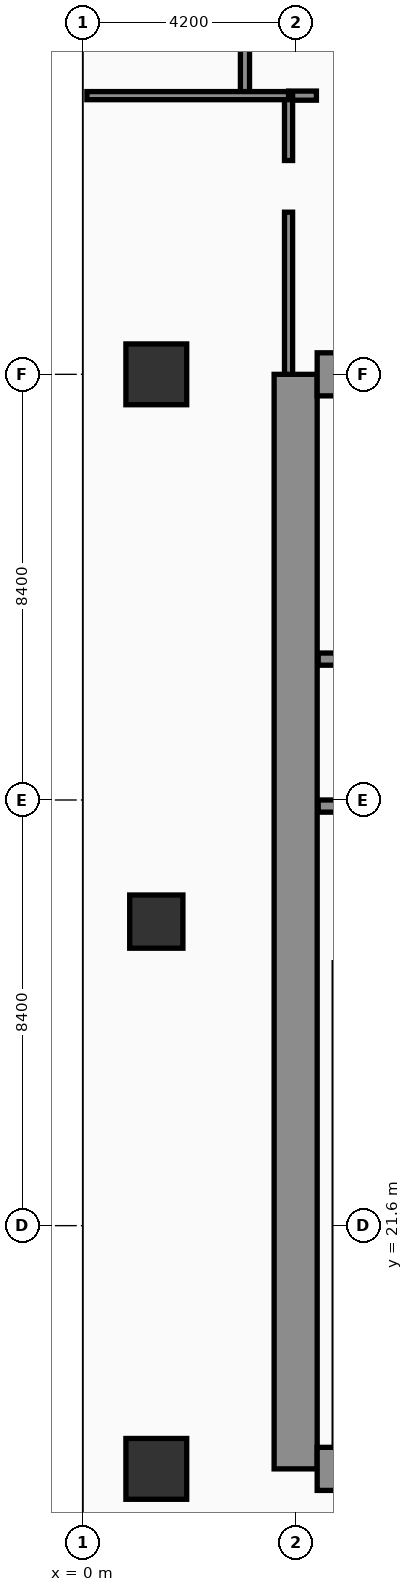
"""IFC4 building model, lengths in metres.
Left out: names, types, materials, properties, quantities, classifications, styles, units other than length and angle.
Written with IfcOpenShell. Run it as: python <this file> out.ifc"""

import sys

from ifc_helpers import new_model, si_unit, direction, frame, frame_2d, origin, origin_2d, place, context, subcontext, project, spatial, rectangle, extrude, element, fill, save


model = new_model("IFC4")
c1 = context("Model", 3, precision=1e-05, world=origin(), true_north=direction((0.0, 1.0)))
c2 = subcontext(c1, "Body", "Model", "MODEL_VIEW")
j1 = project(units=[si_unit("LENGTHUNIT", "METRE"), si_unit("PLANEANGLEUNIT", "RADIAN")], contexts=[c1])
p1 = place(None, origin())
s1 = spatial("IfcSite", under=j1, at=p1, CompositionType="ELEMENT")
p2 = place(p1, origin())
s2 = spatial("IfcBuilding", under=s1, at=p2, CompositionType="ELEMENT")
p3 = place(p2, frame((0.0, 0.0, 144.0)))
s3 = spatial("IfcBuildingStorey", under=s2, at=p3, CompositionType="ELEMENT", Elevation=144.0)
p4 = place(p3, frame((4.2, 16.8, 0.0), z_axis=(0.0, 0.0, 1.0), x_axis=(0.0, 1.0, 0.0)))
e1 = element("IfcWall", 1, at=p4, inside=s3, PredefinedType="SHEAR", context=c2, shape_type="SweptSolid", body=[
    extrude(rectangle(XDim=21.6, YDim=0.85, at=frame_2d((10.8, 0.0))), origin(), (0.0, 0.0, 1.0), 4.26),
])
p5 = place(p3, frame((4.625, 38.4, 0.0), z_axis=(0.0, 0.0, 1.0), x_axis=(1.0, 0.0, 0.0)))
e2 = element("IfcWall", 2, at=p5, inside=s3, PredefinedType="SHEAR", context=c2, shape_type="SweptSolid", body=[
    extrude(rectangle(XDim=9.95, YDim=0.85, at=frame_2d((4.975, 0.0))), origin(), (0.0, 0.0, 1.0), 4.26),
])
p6 = place(p5, frame((5.68, 0.0, 0.0)))
e3 = element("IfcOpeningElement", 3, at=p6, cuts=e2, PredefinedType="OPENING", context=c2, shape_type="SweptSolid", body=[
    extrude(rectangle(XDim=1.1, YDim=2.2, at=frame_2d((0.55, 1.1))), frame((0.0, 0.435, 0.0), z_axis=(0.0, -1.0, 0.0), x_axis=(1.0, 0.0, 0.0)), (0.0, 0.0, 1.0), 0.87),
])
p7 = place(p3, frame((4.625, 16.8, 0.0), z_axis=(0.0, 0.0, 1.0), x_axis=(1.0, 0.0, 0.0)))
e4 = element("IfcWall", 4, at=p7, inside=s3, PredefinedType="SHEAR", context=c2, shape_type="SweptSolid", body=[
    extrude(rectangle(XDim=9.95, YDim=0.85, at=frame_2d((4.975, 0.0))), origin(), (0.0, 0.0, 1.0), 4.26),
])
p8 = place(p3, frame((1.45, 16.8, 0.0), z_axis=(0.0, 0.0, 1.0), x_axis=(1.0, 0.0, 0.0)))
e5 = element("IfcColumn", 5, at=p8, inside=s3, PredefinedType="COLUMN", context=c2, shape_type="SweptSolid", body=[
    extrude(rectangle(XDim=1.2, YDim=1.2, at=origin_2d()), origin(), (0.0, 0.0, 1.0), 4.26),
])
p9 = place(p3, frame((1.45, 27.6, 0.0), z_axis=(0.0, 0.0, 1.0), x_axis=(1.0, 0.0, 0.0)))
e6 = element("IfcColumn", 6, at=p9, inside=s3, PredefinedType="COLUMN", context=c2, shape_type="SweptSolid", body=[
    extrude(rectangle(XDim=1.05, YDim=1.05, at=origin_2d()), origin(), (0.0, 0.0, 1.0), 4.26),
])
p10 = place(p3, frame((1.45, 38.4, 0.0), z_axis=(0.0, 0.0, 1.0), x_axis=(1.0, 0.0, 0.0)))
e7 = element("IfcColumn", 7, at=p10, inside=s3, PredefinedType="COLUMN", context=c2, shape_type="SweptSolid", body=[
    extrude(rectangle(XDim=1.2, YDim=1.2, at=origin_2d()), origin(), (0.0, 0.0, 1.0), 4.26),
])
p11 = place(p3, frame((4.645, 29.88, 0.0), z_axis=(0.0, 0.0, 1.0), x_axis=(1.0, 0.0, 0.0)))
e8 = element("IfcWall", 8, at=p11, inside=s3, PredefinedType="SOLIDWALL", context=c2, shape_type="SweptSolid", body=[
    extrude(rectangle(XDim=4.775, YDim=0.24, at=frame_2d((2.387, 0.0))), origin(), (0.0, 0.0, 1.0), 4.26),
])
p12 = place(p11, frame((0.45, 0.0, 0.0)))
e9 = element("IfcOpeningElement", 9, at=p12, cuts=e8, PredefinedType="OPENING", context=c2, shape_type="SweptSolid", body=[
    extrude(rectangle(XDim=1.3, YDim=2.35, at=frame_2d((0.65, 1.175))), frame((0.0, 0.13, 0.0), z_axis=(0.0, -1.0, 0.0), x_axis=(1.0, 0.0, 0.0)), (0.0, 0.0, 1.0), 0.26),
])
p13 = place(p3, frame((4.645, 32.78, 0.0), z_axis=(0.0, 0.0, 1.0), x_axis=(1.0, 0.0, 0.0)))
e10 = element("IfcWall", 10, at=p13, inside=s3, PredefinedType="SOLIDWALL", context=c2, shape_type="SweptSolid", body=[
    extrude(rectangle(XDim=4.775, YDim=0.24, at=frame_2d((2.387, 0.0))), origin(), (0.0, 0.0, 1.0), 3.89),
])
p14 = place(p3, frame((3.2, 43.9, 0.0), z_axis=(0.0, 0.0, 1.0), x_axis=(0.0, 1.0, 0.0)))
e11 = element("IfcWall", 11, at=p14, inside=s3, PredefinedType="PARTITIONING", context=c2, shape_type="SweptSolid", body=[
    extrude(rectangle(XDim=3.9, YDim=0.18, at=frame_2d((1.95, 0.0))), origin(), (0.0, 0.0, 1.0), 4.26),
])
p15 = place(p3, frame((4.06, 43.9, 0.0), z_axis=(0.0, 0.0, 1.0), x_axis=(1.0, 0.0, 0.0)))
e12 = element("IfcWall", 12, at=p15, inside=s3, PredefinedType="PARTITIONING", context=c2, shape_type="SweptSolid", body=[
    extrude(rectangle(XDim=10.74, YDim=0.18, at=frame_2d((5.37, 0.0))), origin(), (0.0, 0.0, 1.0), 3.64),
])
p16 = place(p15, frame((0.55, 0.0, 0.0)))
e13 = element("IfcOpeningElement", 13, at=p16, cuts=e12, PredefinedType="OPENING", context=c2, shape_type="SweptSolid", body=[
    extrude(rectangle(XDim=1.02, YDim=2.2, at=frame_2d((0.51, 1.1))), frame((0.0, 0.1, 0.0), z_axis=(0.0, -1.0, 0.0), x_axis=(1.0, 0.0, 0.0)), (0.0, 0.0, 1.0), 0.2),
])
p17 = place(p15, frame((4.65, 0.0, 0.0)))
e14 = element("IfcOpeningElement", 14, at=p17, cuts=e12, PredefinedType="OPENING", context=c2, shape_type="SweptSolid", body=[
    extrude(rectangle(XDim=1.02, YDim=2.2, at=frame_2d((0.51, 1.1))), frame((0.0, 0.1, 0.0), z_axis=(0.0, -1.0, 0.0), x_axis=(1.0, 0.0, 0.0)), (0.0, 0.0, 1.0), 0.2),
])
p18 = place(p15, frame((8.4, 0.0, 0.0)))
e15 = element("IfcOpeningElement", 15, at=p18, cuts=e12, PredefinedType="OPENING", context=c2, shape_type="SweptSolid", body=[
    extrude(rectangle(XDim=1.02, YDim=2.2, at=frame_2d((0.51, 1.1))), frame((0.0, 0.1, 0.0), z_axis=(0.0, -1.0, 0.0), x_axis=(1.0, 0.0, 0.0)), (0.0, 0.0, 1.0), 0.2),
])
p19 = place(p3, frame((4.06, 38.4, 0.0), z_axis=(0.0, 0.0, 1.0), x_axis=(0.0, 1.0, 0.0)))
e16 = element("IfcWall", 16, at=p19, inside=s3, PredefinedType="PARTITIONING", context=c2, shape_type="SweptSolid", body=[
    extrude(rectangle(XDim=5.5, YDim=0.16, at=frame_2d((2.75, 0.0))), origin(), (0.0, 0.0, 1.0), 3.64),
])
p20 = place(p19, frame((3.2, 0.0, 0.0)))
e17 = element("IfcOpeningElement", 17, at=p20, cuts=e16, PredefinedType="OPENING", context=c2, shape_type="SweptSolid", body=[
    extrude(rectangle(XDim=1.02, YDim=2.2, at=frame_2d((0.51, 1.1))), frame((0.0, 0.09, 0.0), z_axis=(0.0, -1.0, 0.0), x_axis=(1.0, 0.0, 0.0)), (0.0, 0.0, 1.0), 0.18),
])
p21 = place(p3, frame((0.08, 43.9, 0.0), z_axis=(0.0, 0.0, 1.0), x_axis=(1.0, 0.0, 0.0)))
e18 = element("IfcWall", 18, at=p21, inside=s3, PredefinedType="PARTITIONING", context=c2, shape_type="SweptSolid", body=[
    extrude(rectangle(XDim=3.98, YDim=0.16, at=frame_2d((1.99, 0.0))), origin(), (0.0, 0.0, 1.0), 3.64),
])
p22 = place(p16, origin())
e19 = element("IfcDoor", 19, at=p22, inside=s3, OperationType="SINGLE_SWING_LEFT", PredefinedType="DOOR", context=c2, shape_type="SweptSolid", body=[
    extrude(rectangle(XDim=1.02, YDim=2.2, at=frame_2d((0.51, 1.1))), frame((0.0, 0.025, 0.0), z_axis=(0.0, -1.0, 0.0), x_axis=(1.0, 0.0, 0.0)), (0.0, 0.0, 1.0), 0.05),
])
fill(e13, e19)
p23 = place(p20, origin())
e20 = element("IfcDoor", 20, at=p23, inside=s3, OperationType="SINGLE_SWING_LEFT", PredefinedType="DOOR", context=c2, shape_type="SweptSolid", body=[
    extrude(rectangle(XDim=1.02, YDim=2.2, at=frame_2d((0.51, 1.1))), frame((0.0, 0.025, 0.0), z_axis=(0.0, -1.0, 0.0), x_axis=(1.0, 0.0, 0.0)), (0.0, 0.0, 1.0), 0.05),
])
fill(e17, e20)
save(model, sys.argv[1])
